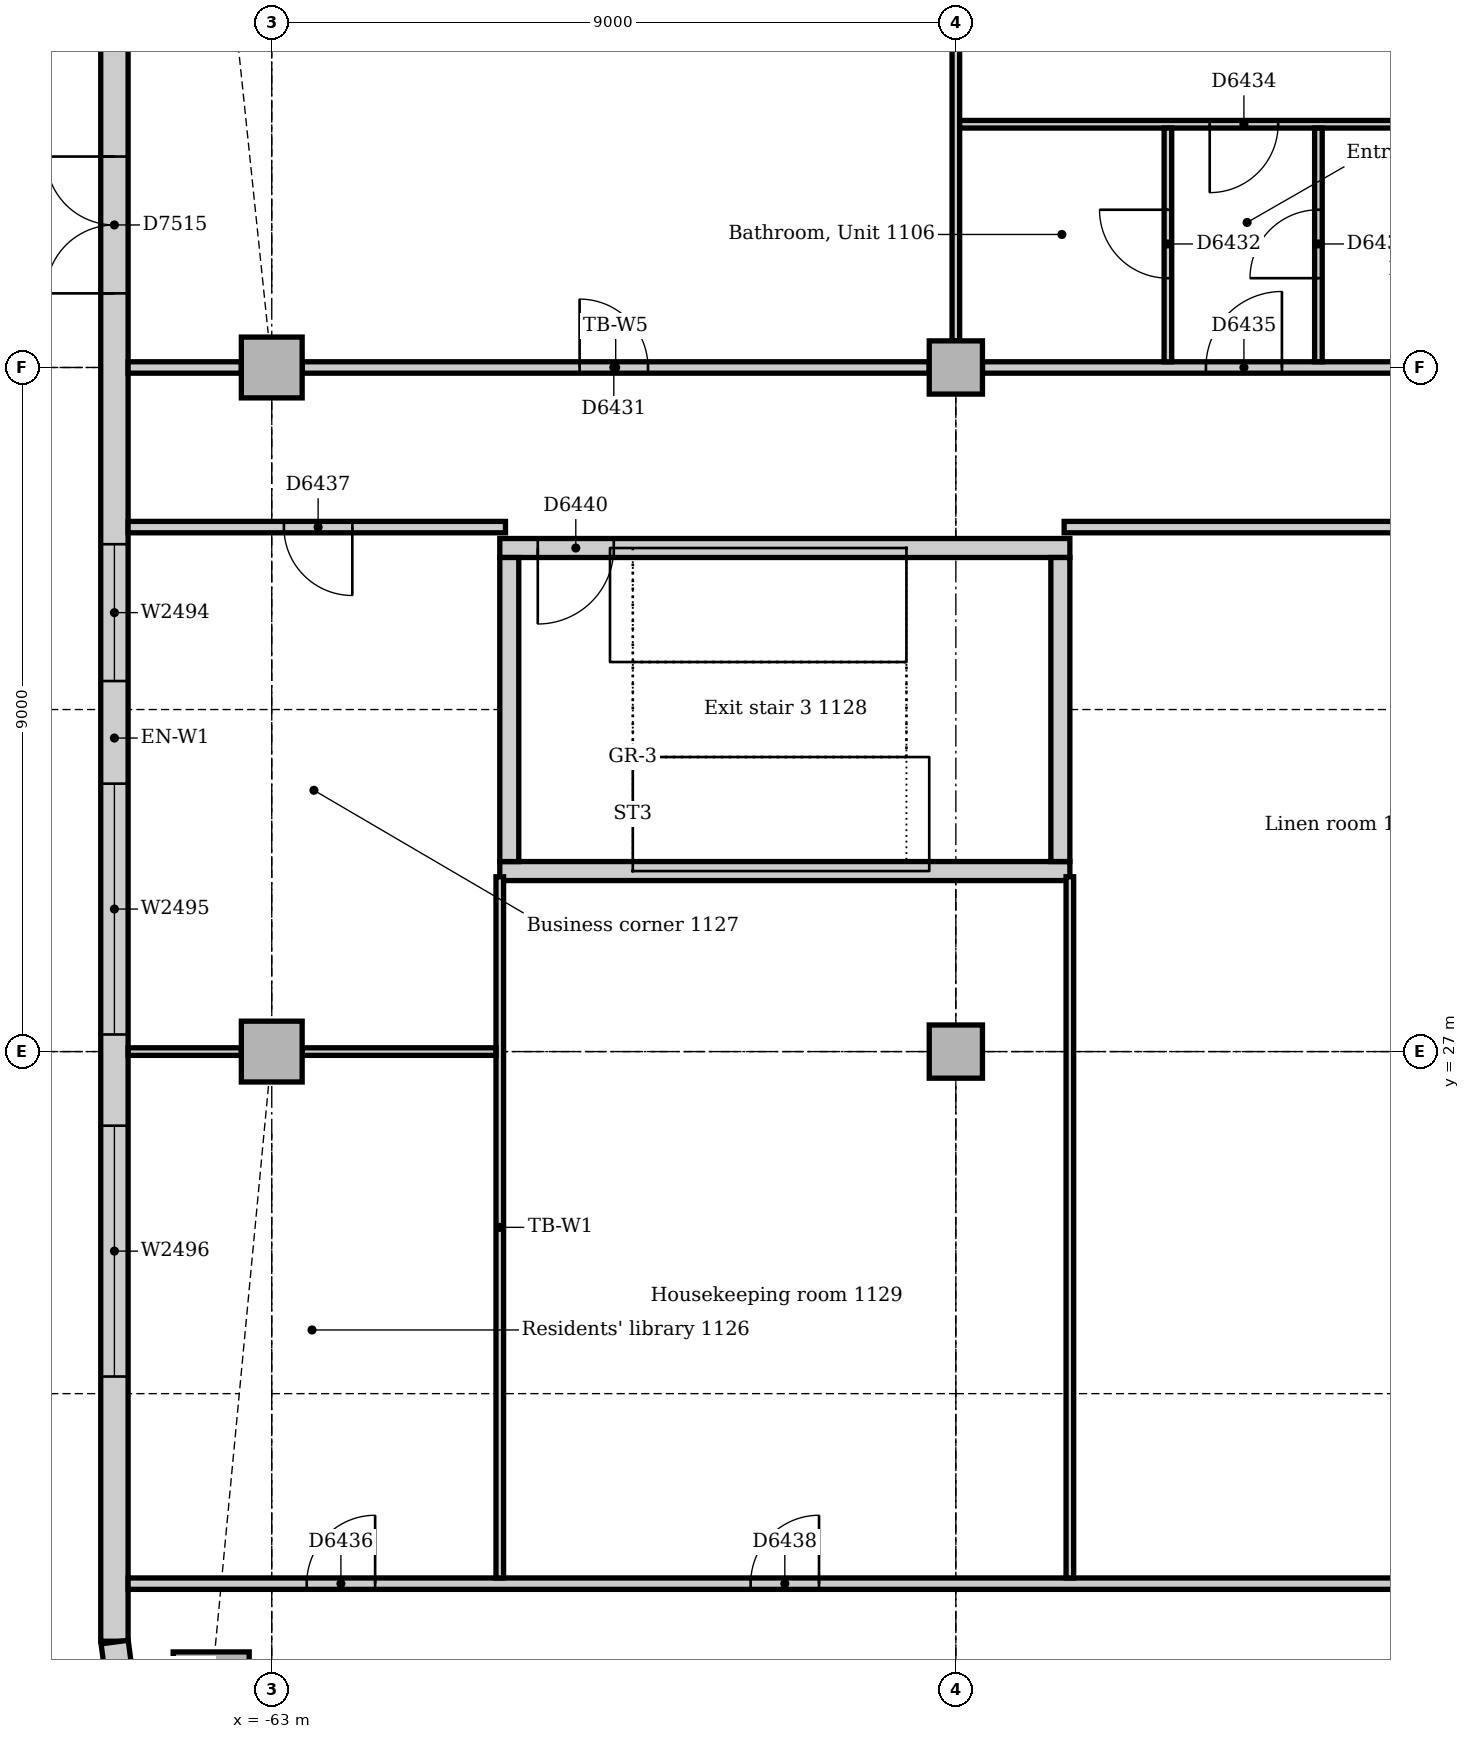
"""IFC4 building model, lengths in metres.
Left out: names, types, materials, properties, quantities, classifications, styles, units other than length and angle.
Written with IfcOpenShell. Run it as: python <this file> out.ifc"""

import sys

from ifc_helpers import new_model, si_unit, direction, frame, frame_2d, origin, origin_2d, place, context, subcontext, project, spatial, rectangle, extrude, element, fill, save


model = new_model("IFC4")
c1 = context("Model", 3, precision=1e-05, world=origin(), true_north=direction((0.0, 1.0)))
c2 = subcontext(c1, "Body", "Model", "MODEL_VIEW")
j1 = project(units=[si_unit("LENGTHUNIT", "METRE"), si_unit("PLANEANGLEUNIT", "RADIAN")], contexts=[c1])
p1 = place(None, origin())
s1 = spatial("IfcSite", under=j1, at=p1, CompositionType="ELEMENT")
p2 = place(p1, origin())
s2 = spatial("IfcBuilding", under=s1, at=p2, CompositionType="ELEMENT")
p3 = place(p2, frame((0.0, 0.0, 51.0)))
s3 = spatial("IfcBuildingStorey", under=s2, at=p3, CompositionType="ELEMENT", Elevation=51.0)
p4 = place(p3, frame((-60.0, 29.375, 0.0), z_axis=(0.0, 0.0, 1.0), x_axis=(1.0, 0.0, 0.0)))
e1 = element("IfcWall", 1, at=p4, inside=s3, PredefinedType="SOLIDWALL", context=c2, shape_type="SweptSolid", body=[
    extrude(rectangle(XDim=7.5, YDim=0.25, at=frame_2d((3.75, 0.0))), origin(), (0.0, 0.0, 1.0), 4.0),
])
p5 = place(p3, frame((-52.5, 33.625, 0.0), z_axis=(0.0, 0.0, 1.0), x_axis=(-1.0, 0.0, 0.0)))
e2 = element("IfcWall", 2, at=p5, inside=s3, PredefinedType="SOLIDWALL", context=c2, shape_type="SweptSolid", body=[
    extrude(rectangle(XDim=7.5, YDim=0.25, at=frame_2d((3.75, 0.0))), origin(), (0.0, 0.0, 1.0), 4.0),
])
p6 = place(p5, frame((6.0, 0.0, 0.0)))
e3 = element("IfcOpeningElement", 3, at=p6, cuts=e2, PredefinedType="OPENING", context=c2, shape_type="SweptSolid", body=[
    extrude(rectangle(XDim=1.0, YDim=2.1, at=frame_2d((0.5, 1.05))), frame((0.0, 0.135, 0.0), z_axis=(0.0, -1.0, 0.0), x_axis=(1.0, 0.0, 0.0)), (0.0, 0.0, 1.0), 0.27),
])
for number, where, z_axis, x_axis in (
    (4, (-52.625, 29.5, 0.0), (0.0, 0.0, 1.0), (0.0, 1.0, 0.0)),
    (5, (-59.875, 33.5, 0.0), (0.0, 0.0, 1.0), (0.0, -1.0, 0.0)),
):
    element("IfcWall", number, at=place(p3, frame(where, z_axis=z_axis, x_axis=x_axis)), inside=s3, PredefinedType="SOLIDWALL", context=c2, shape_type="SweptSolid", body=[
        extrude(rectangle(XDim=4.0, YDim=0.25, at=frame_2d((2.0, 0.0))), origin(), (0.0, 0.0, 1.0), 4.0),
    ])
p7 = place(p3, frame((-63.797, 18.602, -0.15), z_axis=(0.0, 0.0, 1.0), x_axis=(1.0, 0.0, 0.0)))
e6 = element("IfcColumn", 6, at=p7, inside=s3, PredefinedType="COLUMN", context=c2, shape_type="SweptSolid", body=[
    extrude(rectangle(XDim=1.0, YDim=1.0, at=origin_2d()), origin(), (0.0, 0.0, 1.0), 4.0),
])
for number, where, z_axis, x_axis in (
    (7, (-63.0, 27.0, -0.15), (0.0, 0.0, 1.0), (1.0, 0.0, 0.0)),
    (8, (-63.0, 36.0, -0.15), (0.0, 0.0, 1.0), (1.0, 0.0, 0.0)),
):
    element("IfcColumn", number, at=place(p3, frame(where, z_axis=z_axis, x_axis=x_axis)), inside=s3, PredefinedType="COLUMN", context=c2, shape_type="SweptSolid", body=[
        extrude(rectangle(XDim=0.8, YDim=0.8, at=origin_2d()), origin(), (0.0, 0.0, 1.0), 4.0),
    ])
for number, where, z_axis, x_axis in (
    (9, (-54.0, 27.0, 0.0), (0.0, 0.0, 1.0), (1.0, 0.0, 0.0)),
    (10, (-54.0, 36.0, 0.0), (0.0, 0.0, 1.0), (1.0, 0.0, 0.0)),
):
    element("IfcColumn", number, at=place(p3, frame(where, z_axis=z_axis, x_axis=x_axis)), inside=s3, PredefinedType="COLUMN", context=c2, shape_type="SweptSolid", body=[
        extrude(rectangle(XDim=0.7, YDim=0.7, at=origin_2d()), origin(), (0.0, 0.0, 1.0), 3.85),
    ])
p8 = place(p3, frame((-65.07, 43.007, 0.0), z_axis=(0.0, 0.0, 1.0), x_axis=(0.0, -1.0, 0.0)))
e11 = element("IfcWall", 11, at=p8, inside=s3, PredefinedType="STANDARD", context=c2, shape_type="SweptSolid", body=[
    extrude(rectangle(XDim=23.765, YDim=0.36, at=frame_2d((11.882, 0.0))), origin(), (0.0, 0.0, 1.0), 3.85),
])
p9 = place(p8, frame((4.232, 0.0, 0.0)))
e12 = element("IfcOpeningElement", 12, at=p9, cuts=e11, PredefinedType="OPENING", context=c2, shape_type="SweptSolid", body=[
    extrude(rectangle(XDim=1.8, YDim=2.4, at=frame_2d((0.9, 1.2))), frame((0.0, 0.19, 0.0), z_axis=(0.0, -1.0, 0.0), x_axis=(1.0, 0.0, 0.0)), (0.0, 0.0, 1.0), 0.38),
])
p10 = place(p8, frame((9.332, 0.0, 0.9)))
e13 = element("IfcOpeningElement", 13, at=p10, cuts=e11, PredefinedType="OPENING", context=c2, shape_type="SweptSolid", body=[
    extrude(rectangle(XDim=1.8, YDim=1.6, at=frame_2d((0.9, 0.8))), frame((0.0, 0.19, 0.0), z_axis=(0.0, -1.0, 0.0), x_axis=(1.0, 0.0, 0.0)), (0.0, 0.0, 1.0), 0.38),
])
p11 = place(p8, frame((12.482, 0.0, 0.9)))
e14 = element("IfcOpeningElement", 14, at=p11, cuts=e11, PredefinedType="OPENING", context=c2, shape_type="SweptSolid", body=[
    extrude(rectangle(XDim=3.3, YDim=1.6, at=frame_2d((1.65, 0.8))), frame((0.0, 0.19, 0.0), z_axis=(0.0, -1.0, 0.0), x_axis=(1.0, 0.0, 0.0)), (0.0, 0.0, 1.0), 0.38),
])
p12 = place(p8, frame((16.982, 0.0, 0.9)))
e15 = element("IfcOpeningElement", 15, at=p12, cuts=e11, PredefinedType="OPENING", context=c2, shape_type="SweptSolid", body=[
    extrude(rectangle(XDim=3.3, YDim=1.6, at=frame_2d((1.65, 0.8))), frame((0.0, 0.19, 0.0), z_axis=(0.0, -1.0, 0.0), x_axis=(1.0, 0.0, 0.0)), (0.0, 0.0, 1.0), 0.38),
])
p13 = place(p3, frame((-65.067, 19.231, 0.0), z_axis=(0.0, 0.0, 1.0), x_axis=(0.13055608231, -0.99144092581, 0.0)))
e16 = element("IfcWall", 16, at=p13, inside=s3, PredefinedType="STANDARD", context=c2, shape_type="SweptSolid", body=[
    extrude(rectangle(XDim=0.713, YDim=0.36, at=frame_2d((0.356, 0.0))), origin(), (0.0, 0.0, 1.0), 3.85),
])
p14 = place(p3, frame((-53.65, 36.0, 0.0), z_axis=(0.0, 0.0, 1.0), x_axis=(1.0, 0.0, 0.0)))
e17 = element("IfcWall", 17, at=p14, inside=s3, PredefinedType="PARTITIONING", context=c2, shape_type="SweptSolid", body=[
    extrude(rectangle(XDim=8.3, YDim=0.15, at=frame_2d((4.15, 0.0))), origin(), (0.0, 0.0, 1.0), 3.158),
])
p15 = place(p14, frame((2.94, 0.0, 0.0)))
e18 = element("IfcOpeningElement", 18, at=p15, cuts=e17, PredefinedType="OPENING", context=c2, shape_type="SweptSolid", body=[
    extrude(rectangle(XDim=1.0, YDim=2.1, at=frame_2d((0.5, 1.05))), frame((0.0, 0.085, 0.0), z_axis=(0.0, -1.0, 0.0), x_axis=(1.0, 0.0, 0.0)), (0.0, 0.0, 1.0), 0.17),
])
p16 = place(p3, frame((-62.6, 36.0, 0.0), z_axis=(0.0, 0.0, 1.0), x_axis=(1.0, 0.0, 0.0)))
e19 = element("IfcWall", 19, at=p16, inside=s3, PredefinedType="PARTITIONING", context=c2, shape_type="SweptSolid", body=[
    extrude(rectangle(XDim=8.25, YDim=0.15, at=frame_2d((4.125, 0.0))), origin(), (0.0, 0.0, 1.0), 3.158),
])
p17 = place(p16, frame((3.65, 0.0, 0.0)))
e20 = element("IfcOpeningElement", 20, at=p17, cuts=e19, PredefinedType="OPENING", context=c2, shape_type="SweptSolid", body=[
    extrude(rectangle(XDim=0.9, YDim=2.1, at=frame_2d((0.45, 1.05))), frame((0.0, 0.085, 0.0), z_axis=(0.0, -1.0, 0.0), x_axis=(1.0, 0.0, 0.0)), (0.0, 0.0, 1.0), 0.17),
])
p18 = place(p3, frame((-64.89, 36.0, 0.0), z_axis=(0.0, 0.0, 1.0), x_axis=(1.0, 0.0, 0.0)))
e21 = element("IfcWall", 21, at=p18, inside=s3, PredefinedType="PARTITIONING", context=c2, shape_type="SweptSolid", body=[
    extrude(rectangle(XDim=1.49, YDim=0.15, at=frame_2d((0.745, 0.0))), origin(), (0.0, 0.0, 1.0), 3.85),
])
p19 = place(p3, frame((-64.89, 20.0, 0.0), z_axis=(0.0, 0.0, 1.0), x_axis=(1.0, 0.0, 0.0)))
e22 = element("IfcWall", 22, at=p19, inside=s3, PredefinedType="PARTITIONING", context=c2, shape_type="SweptSolid", body=[
    extrude(rectangle(XDim=19.965, YDim=0.15, at=frame_2d((9.982, 0.0))), origin(), (0.0, 0.0, 1.0), 3.85),
])
p20 = place(p19, frame((2.35, 0.0, 0.0)))
e23 = element("IfcOpeningElement", 23, at=p20, cuts=e22, PredefinedType="OPENING", context=c2, shape_type="SweptSolid", body=[
    extrude(rectangle(XDim=0.9, YDim=2.1, at=frame_2d((0.45, 1.05))), frame((0.0, 0.085, 0.0), z_axis=(0.0, -1.0, 0.0), x_axis=(1.0, 0.0, 0.0)), (0.0, 0.0, 1.0), 0.17),
])
p21 = place(p19, frame((8.19, 0.0, 0.0)))
e24 = element("IfcOpeningElement", 24, at=p21, cuts=e22, PredefinedType="OPENING", context=c2, shape_type="SweptSolid", body=[
    extrude(rectangle(XDim=0.9, YDim=2.1, at=frame_2d((0.45, 1.05))), frame((0.0, 0.085, 0.0), z_axis=(0.0, -1.0, 0.0), x_axis=(1.0, 0.0, 0.0)), (0.0, 0.0, 1.0), 0.17),
])
p22 = place(p3, frame((-52.575, 33.9, 0.0), z_axis=(0.0, 0.0, 1.0), x_axis=(1.0, 0.0, 0.0)))
e25 = element("IfcWall", 25, at=p22, inside=s3, PredefinedType="PARTITIONING", context=c2, shape_type="SweptSolid", body=[
    extrude(rectangle(XDim=7.5, YDim=0.15, at=frame_2d((3.75, 0.0))), origin(), (0.0, 0.0, 1.0), 3.85),
])
p23 = place(p3, frame((-64.89, 33.9, 0.0), z_axis=(0.0, 0.0, 1.0), x_axis=(1.0, 0.0, 0.0)))
e26 = element("IfcWall", 26, at=p23, inside=s3, PredefinedType="PARTITIONING", context=c2, shape_type="SweptSolid", body=[
    extrude(rectangle(XDim=4.965, YDim=0.15, at=frame_2d((2.482, 0.0))), origin(), (0.0, 0.0, 1.0), 3.85),
])
p24 = place(p23, frame((2.05, 0.0, 0.0)))
e27 = element("IfcOpeningElement", 27, at=p24, cuts=e26, PredefinedType="OPENING", context=c2, shape_type="SweptSolid", body=[
    extrude(rectangle(XDim=0.9, YDim=2.1, at=frame_2d((0.45, 1.05))), frame((0.0, 0.085, 0.0), z_axis=(0.0, -1.0, 0.0), x_axis=(1.0, 0.0, 0.0)), (0.0, 0.0, 1.0), 0.17),
])
p25 = place(p3, frame((-54.0, 36.35, 0.0), z_axis=(0.0, 0.0, 1.0), x_axis=(0.0, 1.0, 0.0)))
e28 = element("IfcWall", 28, at=p25, inside=s3, PredefinedType="PARTITIONING", context=c2, shape_type="SweptSolid", body=[
    extrude(rectangle(XDim=9.6, YDim=0.1, at=frame_2d((4.8, 0.0))), origin(), (0.0, 0.0, 1.0), 3.256),
])
for number, where, z_axis, x_axis in (
    (29, (-60.0, 20.075, 0.0), (0.0, 0.0, 1.0), (0.0, 1.0, 0.0)),
    (30, (-52.5, 20.075, 0.0), (0.0, 0.0, 1.0), (0.0, 1.0, 0.0)),
):
    element("IfcWall", number, at=place(p3, frame(where, z_axis=z_axis, x_axis=x_axis)), inside=s3, PredefinedType="PARTITIONING", context=c2, shape_type="SweptSolid", body=[
        extrude(rectangle(XDim=9.225, YDim=0.1, at=frame_2d((4.612, 0.0))), origin(), (0.0, 0.0, 1.0), 3.85),
    ])
p26 = place(p3, frame((-53.95, 39.2, 0.0), z_axis=(0.0, 0.0, 1.0), x_axis=(1.0, 0.0, 0.0)))
e31 = element("IfcWall", 31, at=p26, inside=s3, PredefinedType="PARTITIONING", context=c2, shape_type="SweptSolid", body=[
    extrude(rectangle(XDim=8.9, YDim=0.1, at=frame_2d((4.45, 0.0))), origin(), (0.0, 0.0, 1.0), 3.85),
])
p27 = place(p26, frame((3.29, 0.0, 0.0)))
e32 = element("IfcOpeningElement", 32, at=p27, cuts=e31, PredefinedType="OPENING", context=c2, shape_type="SweptSolid", body=[
    extrude(rectangle(XDim=0.9, YDim=2.1, at=frame_2d((0.45, 1.05))), frame((0.0, 0.06, 0.0), z_axis=(0.0, -1.0, 0.0), x_axis=(1.0, 0.0, 0.0)), (0.0, 0.0, 1.0), 0.12),
])
p28 = place(p3, frame((-62.6, 27.0, 0.0), z_axis=(0.0, 0.0, 1.0), x_axis=(1.0, 0.0, 0.0)))
e33 = element("IfcWall", 33, at=p28, inside=s3, PredefinedType="PARTITIONING", context=c2, shape_type="SweptSolid", body=[
    extrude(rectangle(XDim=2.55, YDim=0.1, at=frame_2d((1.275, 0.0))), origin(), (0.0, 0.0, 1.0), 3.158),
])
p29 = place(p3, frame((-64.89, 27.0, 0.0), z_axis=(0.0, 0.0, 1.0), x_axis=(1.0, 0.0, 0.0)))
e34 = element("IfcWall", 34, at=p29, inside=s3, PredefinedType="PARTITIONING", context=c2, shape_type="SweptSolid", body=[
    extrude(rectangle(XDim=1.49, YDim=0.1, at=frame_2d((0.745, 0.0))), origin(), (0.0, 0.0, 1.0), 3.85),
])
p30 = place(p3, frame((-51.21, 36.075, 0.0), z_axis=(0.0, 0.0, 1.0), x_axis=(0.0, 1.0, 0.0)))
e35 = element("IfcWall", 35, at=p30, inside=s3, PredefinedType="PARTITIONING", context=c2, shape_type="SweptSolid", body=[
    extrude(rectangle(XDim=3.075, YDim=0.1, at=frame_2d((1.538, 0.0))), origin(), (0.0, 0.0, 1.0), 3.85),
])
p31 = place(p30, frame((1.1, 0.0, 0.0)))
e36 = element("IfcOpeningElement", 36, at=p31, cuts=e35, PredefinedType="OPENING", context=c2, shape_type="SweptSolid", body=[
    extrude(rectangle(XDim=0.9, YDim=2.1, at=frame_2d((0.45, 1.05))), frame((0.0, 0.06, 0.0), z_axis=(0.0, -1.0, 0.0), x_axis=(1.0, 0.0, 0.0)), (0.0, 0.0, 1.0), 0.12),
])
p32 = place(p3, frame((-49.23, 36.075, 0.0), z_axis=(0.0, 0.0, 1.0), x_axis=(0.0, 1.0, 0.0)))
e37 = element("IfcWall", 37, at=p32, inside=s3, PredefinedType="PARTITIONING", context=c2, shape_type="SweptSolid", body=[
    extrude(rectangle(XDim=3.075, YDim=0.1, at=frame_2d((1.538, 0.0))), origin(), (0.0, 0.0, 1.0), 3.85),
])
p33 = place(p32, frame((1.1, 0.0, 0.0)))
e38 = element("IfcOpeningElement", 38, at=p33, cuts=e37, PredefinedType="OPENING", context=c2, shape_type="SweptSolid", body=[
    extrude(rectangle(XDim=0.9, YDim=2.1, at=frame_2d((0.45, 1.05))), frame((0.0, 0.06, 0.0), z_axis=(0.0, -1.0, 0.0), x_axis=(1.0, 0.0, 0.0)), (0.0, 0.0, 1.0), 0.12),
])
p34 = place(p9, frame((1.8, 0.0, 0.0), z_axis=(0.0, 0.0, 1.0), x_axis=(-1.0, 0.0, 0.0)))
e39 = element("IfcDoor", 39, at=p34, inside=s3, OperationType="DOUBLE_DOOR_SINGLE_SWING", PredefinedType="DOOR", context=c2, shape_type="SweptSolid", body=[
    extrude(rectangle(XDim=1.8, YDim=2.4, at=frame_2d((0.9, 1.2))), frame((0.0, -0.07, 0.0), z_axis=(0.0, -1.0, 0.0), x_axis=(1.0, 0.0, 0.0)), (0.0, 0.0, 1.0), 0.05),
])
fill(e12, e39)
p35 = place(p10, origin())
e40 = element("IfcWindow", 40, at=p35, inside=s3, PartitioningType="SINGLE_PANEL", PredefinedType="WINDOW", context=c2, shape_type="SweptSolid", body=[
    extrude(rectangle(XDim=1.8, YDim=1.6, at=frame_2d((0.9, 0.8))), frame((0.0, 0.13, 0.0), z_axis=(0.0, -1.0, 0.0), x_axis=(1.0, 0.0, 0.0)), (0.0, 0.0, 1.0), 0.06),
])
fill(e13, e40)
p36 = place(p11, origin())
e41 = element("IfcWindow", 41, at=p36, inside=s3, PartitioningType="SINGLE_PANEL", PredefinedType="WINDOW", context=c2, shape_type="SweptSolid", body=[
    extrude(rectangle(XDim=3.3, YDim=1.6, at=frame_2d((1.65, 0.8))), frame((0.0, 0.13, 0.0), z_axis=(0.0, -1.0, 0.0), x_axis=(1.0, 0.0, 0.0)), (0.0, 0.0, 1.0), 0.06),
])
fill(e14, e41)
p37 = place(p12, origin())
e42 = element("IfcWindow", 42, at=p37, inside=s3, PartitioningType="SINGLE_PANEL", PredefinedType="WINDOW", context=c2, shape_type="SweptSolid", body=[
    extrude(rectangle(XDim=3.3, YDim=1.6, at=frame_2d((1.65, 0.8))), frame((0.0, 0.13, 0.0), z_axis=(0.0, -1.0, 0.0), x_axis=(1.0, 0.0, 0.0)), (0.0, 0.0, 1.0), 0.06),
])
fill(e15, e42)
p38 = place(p17, origin())
e43 = element("IfcDoor", 43, at=p38, inside=s3, OperationType="SINGLE_SWING_LEFT", PredefinedType="DOOR", context=c2, shape_type="SweptSolid", body=[
    extrude(rectangle(XDim=0.9, YDim=2.1, at=frame_2d((0.45, 1.05))), frame((0.0, 0.025, 0.0), z_axis=(0.0, -1.0, 0.0), x_axis=(1.0, 0.0, 0.0)), (0.0, 0.0, 1.0), 0.05),
])
fill(e20, e43)
p39 = place(p31, origin())
e44 = element("IfcDoor", 44, at=p39, inside=s3, OperationType="SINGLE_SWING_RIGHT", PredefinedType="DOOR", context=c2, shape_type="SweptSolid", body=[
    extrude(rectangle(XDim=0.9, YDim=2.1, at=frame_2d((0.45, 1.05))), frame((0.0, 0.025, 0.0), z_axis=(0.0, -1.0, 0.0), x_axis=(1.0, 0.0, 0.0)), (0.0, 0.0, 1.0), 0.05),
])
fill(e36, e44)
p40 = place(p33, origin())
e45 = element("IfcDoor", 45, at=p40, inside=s3, OperationType="SINGLE_SWING_LEFT", PredefinedType="DOOR", context=c2, shape_type="SweptSolid", body=[
    extrude(rectangle(XDim=0.9, YDim=2.1, at=frame_2d((0.45, 1.05))), frame((0.0, 0.025, 0.0), z_axis=(0.0, -1.0, 0.0), x_axis=(1.0, 0.0, 0.0)), (0.0, 0.0, 1.0), 0.05),
])
fill(e38, e45)
p41 = place(p27, frame((0.9, 0.0, 0.0), z_axis=(0.0, 0.0, 1.0), x_axis=(-1.0, 0.0, 0.0)))
e46 = element("IfcDoor", 46, at=p41, inside=s3, OperationType="SINGLE_SWING_RIGHT", PredefinedType="DOOR", context=c2, shape_type="SweptSolid", body=[
    extrude(rectangle(XDim=0.9, YDim=2.1, at=frame_2d((0.45, 1.05))), frame((0.0, 0.025, 0.0), z_axis=(0.0, -1.0, 0.0), x_axis=(1.0, 0.0, 0.0)), (0.0, 0.0, 1.0), 0.05),
])
fill(e32, e46)
p42 = place(p15, origin())
e47 = element("IfcDoor", 47, at=p42, inside=s3, OperationType="SINGLE_SWING_RIGHT", PredefinedType="DOOR", context=c2, shape_type="SweptSolid", body=[
    extrude(rectangle(XDim=1.0, YDim=2.1, at=frame_2d((0.5, 1.05))), frame((0.0, 0.025, 0.0), z_axis=(0.0, -1.0, 0.0), x_axis=(1.0, 0.0, 0.0)), (0.0, 0.0, 1.0), 0.05),
])
fill(e18, e47)
p43 = place(p20, origin())
e48 = element("IfcDoor", 48, at=p43, inside=s3, OperationType="SINGLE_SWING_RIGHT", PredefinedType="DOOR", context=c2, shape_type="SweptSolid", body=[
    extrude(rectangle(XDim=0.9, YDim=2.1, at=frame_2d((0.45, 1.05))), frame((0.0, 0.025, 0.0), z_axis=(0.0, -1.0, 0.0), x_axis=(1.0, 0.0, 0.0)), (0.0, 0.0, 1.0), 0.05),
])
fill(e23, e48)
p44 = place(p24, frame((0.9, 0.0, 0.0), z_axis=(0.0, 0.0, 1.0), x_axis=(-1.0, 0.0, 0.0)))
e49 = element("IfcDoor", 49, at=p44, inside=s3, OperationType="SINGLE_SWING_LEFT", PredefinedType="DOOR", context=c2, shape_type="SweptSolid", body=[
    extrude(rectangle(XDim=0.9, YDim=2.1, at=frame_2d((0.45, 1.05))), frame((0.0, 0.025, 0.0), z_axis=(0.0, -1.0, 0.0), x_axis=(1.0, 0.0, 0.0)), (0.0, 0.0, 1.0), 0.05),
])
fill(e27, e49)
p45 = place(p21, origin())
e50 = element("IfcDoor", 50, at=p45, inside=s3, OperationType="SINGLE_SWING_RIGHT", PredefinedType="DOOR", context=c2, shape_type="SweptSolid", body=[
    extrude(rectangle(XDim=0.9, YDim=2.1, at=frame_2d((0.45, 1.05))), frame((0.0, 0.025, 0.0), z_axis=(0.0, -1.0, 0.0), x_axis=(1.0, 0.0, 0.0)), (0.0, 0.0, 1.0), 0.05),
])
fill(e24, e50)
p46 = place(p6, origin())
e51 = element("IfcDoor", 51, at=p46, inside=s3, OperationType="SINGLE_SWING_RIGHT", PredefinedType="DOOR", context=c2, shape_type="SweptSolid", body=[
    extrude(rectangle(XDim=1.0, YDim=2.1, at=frame_2d((0.5, 1.05))), frame((0.0, 0.025, 0.0), z_axis=(0.0, -1.0, 0.0), x_axis=(1.0, 0.0, 0.0)), (0.0, 0.0, 1.0), 0.05),
])
fill(e3, e51)
save(model, sys.argv[1])
